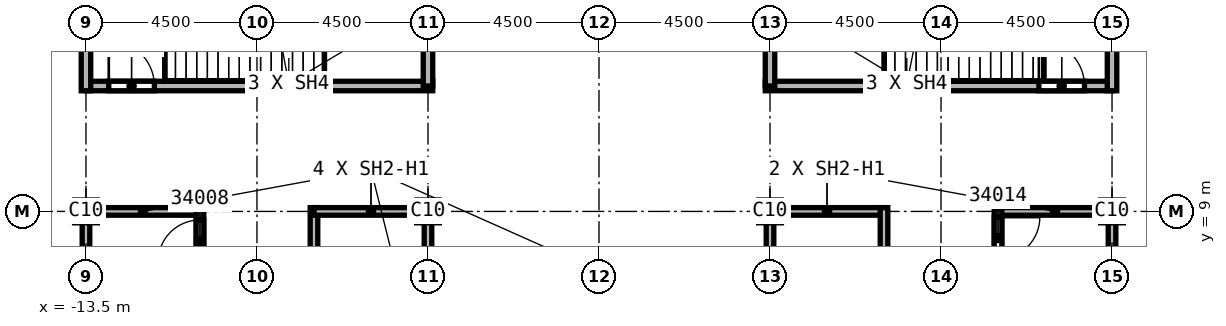
"""IFC4 building model, lengths in metres.
Left out: names, types, materials, properties, quantities, classifications, styles, units other than length and angle.
Written with IfcOpenShell. Run it as: python <this file> out.ifc"""

import sys

from ifc_helpers import new_model, si_unit, direction, frame, frame_2d, origin, origin_2d, place, context, subcontext, project, spatial, rectangle, extrude, element, fill, save


model = new_model("IFC4")
c1 = context("Model", 3, precision=1e-05, world=origin(), true_north=direction((0.0, 1.0)))
c2 = subcontext(c1, "Body", "Model", "MODEL_VIEW")
j1 = project(units=[si_unit("LENGTHUNIT", "METRE"), si_unit("PLANEANGLEUNIT", "RADIAN")], contexts=[c1])
p1 = place(None, origin())
s1 = spatial("IfcSite", under=j1, at=p1, CompositionType="ELEMENT")
p2 = place(p1, origin())
s2 = spatial("IfcBuilding", under=s1, at=p2, CompositionType="ELEMENT")
p3 = place(p2, frame((0.0, 0.0, 366.0)))
s3 = spatial("IfcBuildingStorey", under=s2, at=p3, CompositionType="ELEMENT", Elevation=366.0)
for number, where, z_axis, x_axis in (
    (1, (4.5, 9.0, 0.0), (0.0, 0.0, 1.0), (1.0, 0.0, 0.0)),
    (2, (13.5, 9.0, 0.0), (0.0, 0.0, 1.0), (1.0, 0.0, 0.0)),
    (3, (-4.5, 9.0, 0.0), (0.0, 0.0, 1.0), (1.0, 0.0, 0.0)),
    (4, (-13.5, 9.0, 0.0), (0.0, 0.0, 1.0), (1.0, 0.0, 0.0)),
):
    element("IfcColumn", number, at=place(p3, frame(where, z_axis=z_axis, x_axis=x_axis)), inside=s3, PredefinedType="COLUMN", context=c2, shape_type="SweptSolid", body=[
        extrude(rectangle(XDim=0.6, YDim=0.6, at=origin_2d()), origin(), (0.0, 0.0, 1.0), 9.6),
    ])
p4 = place(p3, frame((-13.5, 6.0, 0.0), z_axis=(0.0, 0.0, 1.0), x_axis=(0.0, 1.0, 0.0)))
e5 = element("IfcWall", 5, at=p4, inside=s3, PredefinedType="SOLIDWALL", context=c2, shape_type="SweptSolid", body=[
    extrude(rectangle(XDim=3.1, YDim=0.2, at=frame_2d((1.55, 0.0))), origin(), (0.0, 0.0, 1.0), 5.76),
])
p5 = place(p3, frame((-13.5, 9.0, 0.0), z_axis=(0.0, 0.0, 1.0), x_axis=(1.0, 0.0, 0.0)))
e6 = element("IfcWall", 6, at=p5, inside=s3, PredefinedType="SOLIDWALL", context=c2, shape_type="SweptSolid", body=[
    extrude(rectangle(XDim=3.0, YDim=0.2, at=frame_2d((1.5, 0.0))), origin(), (0.0, 0.0, 1.0), 8.838),
])
p6 = place(p3, frame((-10.5, 5.925, 0.0), z_axis=(0.0, 0.0, 1.0), x_axis=(0.0, 1.0, 0.0)))
e7 = element("IfcWall", 7, at=p6, inside=s3, PredefinedType="SOLIDWALL", context=c2, shape_type="SweptSolid", body=[
    extrude(rectangle(XDim=3.175, YDim=0.2, at=frame_2d((1.587, 0.0))), origin(), (0.0, 0.0, 1.0), 9.15),
])
p7 = place(p6, frame((1.75, 0.0, 0.0)))
e8 = element("IfcOpeningElement", 8, at=p7, cuts=e7, PredefinedType="OPENING", context=c2, shape_type="SweptSolid", body=[
    extrude(rectangle(XDim=1.1, YDim=2.1, at=frame_2d((0.55, 1.05))), frame((0.0, 0.1, 0.0), z_axis=(0.0, -1.0, 0.0), x_axis=(1.0, 0.0, 0.0)), (0.0, 0.0, 1.0), 0.2),
])
p8 = place(p3, frame((-7.5, 2.875, 0.0), z_axis=(0.0, 0.0, 1.0), x_axis=(0.0, 1.0, 0.0)))
e9 = element("IfcWall", 9, at=p8, inside=s3, PredefinedType="SOLIDWALL", context=c2, shape_type="SweptSolid", body=[
    extrude(rectangle(XDim=6.225, YDim=0.2, at=frame_2d((3.113, 0.0))), origin(), (0.0, 0.0, 1.0), 9.15),
])
p9 = place(p3, frame((-7.5, 9.0, 0.0), z_axis=(0.0, 0.0, 1.0), x_axis=(1.0, 0.0, 0.0)))
e10 = element("IfcWall", 10, at=p9, inside=s3, PredefinedType="SOLIDWALL", context=c2, shape_type="SweptSolid", body=[
    extrude(rectangle(XDim=3.0, YDim=0.2, at=frame_2d((1.5, 0.0))), origin(), (0.0, 0.0, 1.0), 8.838),
])
p10 = place(p3, frame((-4.5, 9.1, 0.0), z_axis=(0.0, 0.0, 1.0), x_axis=(0.0, -1.0, 0.0)))
e11 = element("IfcWall", 11, at=p10, inside=s3, PredefinedType="SOLIDWALL", context=c2, shape_type="SweptSolid", body=[
    extrude(rectangle(XDim=18.2, YDim=0.2, at=frame_2d((9.1, 0.0))), origin(), (0.0, 0.0, 1.0), 8.838),
])
p11 = place(p10, frame((15.35, 0.0, 0.0)))
e12 = element("IfcOpeningElement", 12, at=p11, cuts=e11, PredefinedType="OPENING", context=c2, shape_type="SweptSolid", body=[
    extrude(rectangle(XDim=1.1, YDim=2.1, at=frame_2d((0.55, 1.05))), frame((0.0, 0.1, 0.0), z_axis=(0.0, -1.0, 0.0), x_axis=(1.0, 0.0, 0.0)), (0.0, 0.0, 1.0), 0.2),
])
p12 = place(p10, frame((9.85, 0.0, 0.0)))
e13 = element("IfcOpeningElement", 13, at=p12, cuts=e11, PredefinedType="OPENING", context=c2, shape_type="SweptSolid", body=[
    extrude(rectangle(XDim=1.1, YDim=2.1, at=frame_2d((0.55, 1.05))), frame((0.0, 0.1, 0.0), z_axis=(0.0, -1.0, 0.0), x_axis=(1.0, 0.0, 0.0)), (0.0, 0.0, 1.0), 0.2),
])
p13 = place(p3, frame((4.5, -9.1, 0.0), z_axis=(0.0, 0.0, 1.0), x_axis=(0.0, 1.0, 0.0)))
e14 = element("IfcWall", 14, at=p13, inside=s3, PredefinedType="SOLIDWALL", context=c2, shape_type="SweptSolid", body=[
    extrude(rectangle(XDim=18.2, YDim=0.2, at=frame_2d((9.1, 0.0))), origin(), (0.0, 0.0, 1.0), 8.838),
])
p14 = place(p13, frame((1.0, 0.0, 0.0)))
e15 = element("IfcOpeningElement", 15, at=p14, cuts=e14, PredefinedType="OPENING", context=c2, shape_type="SweptSolid", body=[
    extrude(rectangle(XDim=1.1, YDim=2.1, at=frame_2d((0.55, 1.05))), frame((0.0, 0.1, 0.0), z_axis=(0.0, -1.0, 0.0), x_axis=(1.0, 0.0, 0.0)), (0.0, 0.0, 1.0), 0.2),
])
p15 = place(p13, frame((9.95, 0.0, 0.0)))
e16 = element("IfcOpeningElement", 16, at=p15, cuts=e14, PredefinedType="OPENING", context=c2, shape_type="SweptSolid", body=[
    extrude(rectangle(XDim=1.1, YDim=2.1, at=frame_2d((0.55, 1.05))), frame((0.0, 0.1, 0.0), z_axis=(0.0, -1.0, 0.0), x_axis=(1.0, 0.0, 0.0)), (0.0, 0.0, 1.0), 0.2),
])
p16 = place(p3, frame((4.5, 9.0, 0.0), z_axis=(0.0, 0.0, 1.0), x_axis=(1.0, 0.0, 0.0)))
e17 = element("IfcWall", 17, at=p16, inside=s3, PredefinedType="SOLIDWALL", context=c2, shape_type="SweptSolid", body=[
    extrude(rectangle(XDim=3.0, YDim=0.2, at=frame_2d((1.5, 0.0))), origin(), (0.0, 0.0, 1.0), 8.838),
])
p17 = place(p3, frame((7.5, 9.1, 0.0), z_axis=(0.0, 0.0, 1.0), x_axis=(0.0, -1.0, 0.0)))
e18 = element("IfcWall", 18, at=p17, inside=s3, PredefinedType="SOLIDWALL", context=c2, shape_type="SweptSolid", body=[
    extrude(rectangle(XDim=6.225, YDim=0.2, at=frame_2d((3.113, 0.0))), origin(), (0.0, 0.0, 1.0), 9.15),
])
p18 = place(p3, frame((10.5, 9.0, 0.0), z_axis=(0.0, 0.0, 1.0), x_axis=(1.0, 0.0, 0.0)))
e19 = element("IfcWall", 19, at=p18, inside=s3, PredefinedType="SOLIDWALL", context=c2, shape_type="SweptSolid", body=[
    extrude(rectangle(XDim=3.0, YDim=0.2, at=frame_2d((1.5, 0.0))), origin(), (0.0, 0.0, 1.0), 8.838),
])
p19 = place(p3, frame((10.5, 9.1, 0.0), z_axis=(0.0, 0.0, 1.0), x_axis=(0.0, -1.0, 0.0)))
e20 = element("IfcWall", 20, at=p19, inside=s3, PredefinedType="SOLIDWALL", context=c2, shape_type="SweptSolid", body=[
    extrude(rectangle(XDim=3.225, YDim=0.2, at=frame_2d((1.613, 0.0))), origin(), (0.0, 0.0, 1.0), 9.15),
])
p20 = place(p19, frame((0.25, 0.0, 0.0)))
e21 = element("IfcOpeningElement", 21, at=p20, cuts=e20, PredefinedType="OPENING", context=c2, shape_type="SweptSolid", body=[
    extrude(rectangle(XDim=1.1, YDim=2.1, at=frame_2d((0.55, 1.05))), frame((0.0, 0.1, 0.0), z_axis=(0.0, -1.0, 0.0), x_axis=(1.0, 0.0, 0.0)), (0.0, 0.0, 1.0), 0.2),
])
p21 = place(p3, frame((13.5, 9.1, 0.0), z_axis=(0.0, 0.0, 1.0), x_axis=(0.0, -1.0, 0.0)))
e22 = element("IfcWall", 22, at=p21, inside=s3, PredefinedType="SOLIDWALL", context=c2, shape_type="SweptSolid", body=[
    extrude(rectangle(XDim=3.1, YDim=0.2, at=frame_2d((1.55, 0.0))), origin(), (0.0, 0.0, 1.0), 5.76),
])
p22 = place(p3, frame((-13.5, 12.3, 0.0), z_axis=(0.0, 0.0, 1.0), x_axis=(1.0, 0.0, 0.0)))
e23 = element("IfcWall", 23, at=p22, inside=s3, PredefinedType="SOLIDWALL", context=c2, shape_type="SweptSolid", body=[
    extrude(rectangle(XDim=9.125, YDim=0.25, at=frame_2d((4.562, 0.0))), origin(), (0.0, 0.0, 1.0), 9.15),
])
p23 = place(p22, frame((0.6, 0.0, 0.0)))
e24 = element("IfcOpeningElement", 24, at=p23, cuts=e23, PredefinedType="OPENING", context=c2, shape_type="SweptSolid", body=[
    extrude(rectangle(XDim=1.2, YDim=2.1, at=frame_2d((0.6, 1.05))), frame((0.0, 0.125, 0.0), z_axis=(0.0, -1.0, 0.0), x_axis=(1.0, 0.0, 0.0)), (0.0, 0.0, 1.0), 0.25),
])
p24 = place(p3, frame((-13.5, 12.175, 0.0), z_axis=(0.0, 0.0, 1.0), x_axis=(0.0, 1.0, 0.0)))
e25 = element("IfcWall", 25, at=p24, inside=s3, PredefinedType="SOLIDWALL", context=c2, shape_type="SweptSolid", body=[
    extrude(rectangle(XDim=4.75, YDim=0.25, at=frame_2d((2.375, 0.0))), origin(), (0.0, 0.0, 1.0), 5.76),
])
p25 = place(p3, frame((-4.5, 16.925, 0.0), z_axis=(0.0, 0.0, 1.0), x_axis=(0.0, -1.0, 0.0)))
e26 = element("IfcWall", 26, at=p25, inside=s3, PredefinedType="SOLIDWALL", context=c2, shape_type="SweptSolid", body=[
    extrude(rectangle(XDim=4.625, YDim=0.25, at=frame_2d((2.312, 0.0))), origin(), (0.0, 0.0, 1.0), 9.15),
])
p26 = place(p3, frame((4.375, 12.3, 0.0), z_axis=(0.0, 0.0, 1.0), x_axis=(1.0, 0.0, 0.0)))
e27 = element("IfcWall", 27, at=p26, inside=s3, PredefinedType="SOLIDWALL", context=c2, shape_type="SweptSolid", body=[
    extrude(rectangle(XDim=9.125, YDim=0.25, at=frame_2d((4.562, 0.0))), origin(), (0.0, 0.0, 1.0), 9.15),
])
p27 = place(p26, frame((7.2, 0.0, 0.0)))
e28 = element("IfcOpeningElement", 28, at=p27, cuts=e27, PredefinedType="OPENING", context=c2, shape_type="SweptSolid", body=[
    extrude(rectangle(XDim=1.2, YDim=2.1, at=frame_2d((0.6, 1.05))), frame((0.0, 0.125, 0.0), z_axis=(0.0, -1.0, 0.0), x_axis=(1.0, 0.0, 0.0)), (0.0, 0.0, 1.0), 0.25),
])
p28 = place(p3, frame((4.5, 12.3, 0.0), z_axis=(0.0, 0.0, 1.0), x_axis=(0.0, 1.0, 0.0)))
e29 = element("IfcWall", 29, at=p28, inside=s3, PredefinedType="SOLIDWALL", context=c2, shape_type="SweptSolid", body=[
    extrude(rectangle(XDim=4.625, YDim=0.25, at=frame_2d((2.312, 0.0))), origin(), (0.0, 0.0, 1.0), 9.15),
])
p29 = place(p3, frame((13.5, 12.175, 0.0), z_axis=(0.0, 0.0, 1.0), x_axis=(0.0, 1.0, 0.0)))
e30 = element("IfcWall", 30, at=p29, inside=s3, PredefinedType="SOLIDWALL", context=c2, shape_type="SweptSolid", body=[
    extrude(rectangle(XDim=4.75, YDim=0.25, at=frame_2d((2.375, 0.0))), origin(), (0.0, 0.0, 1.0), 5.76),
])
p30 = place(p7, origin())
e31 = element("IfcDoor", 31, at=p30, inside=s3, OperationType="SINGLE_SWING_LEFT", PredefinedType="DOOR", context=c2, shape_type="SweptSolid", body=[
    extrude(rectangle(XDim=1.1, YDim=2.1, at=frame_2d((0.55, 1.05))), frame((0.0, 0.025, 0.0), z_axis=(0.0, -1.0, 0.0), x_axis=(1.0, 0.0, 0.0)), (0.0, 0.0, 1.0), 0.05),
])
fill(e8, e31)
p31 = place(p20, origin())
e32 = element("IfcDoor", 32, at=p31, inside=s3, OperationType="SINGLE_SWING_LEFT", PredefinedType="DOOR", context=c2, shape_type="SweptSolid", body=[
    extrude(rectangle(XDim=1.1, YDim=2.1, at=frame_2d((0.55, 1.05))), frame((0.0, 0.025, 0.0), z_axis=(0.0, -1.0, 0.0), x_axis=(1.0, 0.0, 0.0)), (0.0, 0.0, 1.0), 0.05),
])
fill(e21, e32)
p32 = place(p23, origin())
e33 = element("IfcDoor", 33, at=p32, inside=s3, OperationType="SINGLE_SWING_RIGHT", PredefinedType="DOOR", context=c2, shape_type="SweptSolid", body=[
    extrude(rectangle(XDim=1.2, YDim=2.1, at=frame_2d((0.6, 1.05))), frame((0.0, 0.025, 0.0), z_axis=(0.0, -1.0, 0.0), x_axis=(1.0, 0.0, 0.0)), (0.0, 0.0, 1.0), 0.05),
])
fill(e24, e33)
p33 = place(p27, origin())
e34 = element("IfcDoor", 34, at=p33, inside=s3, OperationType="SINGLE_SWING_RIGHT", PredefinedType="DOOR", context=c2, shape_type="SweptSolid", body=[
    extrude(rectangle(XDim=1.2, YDim=2.1, at=frame_2d((0.6, 1.05))), frame((0.0, 0.025, 0.0), z_axis=(0.0, -1.0, 0.0), x_axis=(1.0, 0.0, 0.0)), (0.0, 0.0, 1.0), 0.05),
])
fill(e28, e34)
save(model, sys.argv[1])
